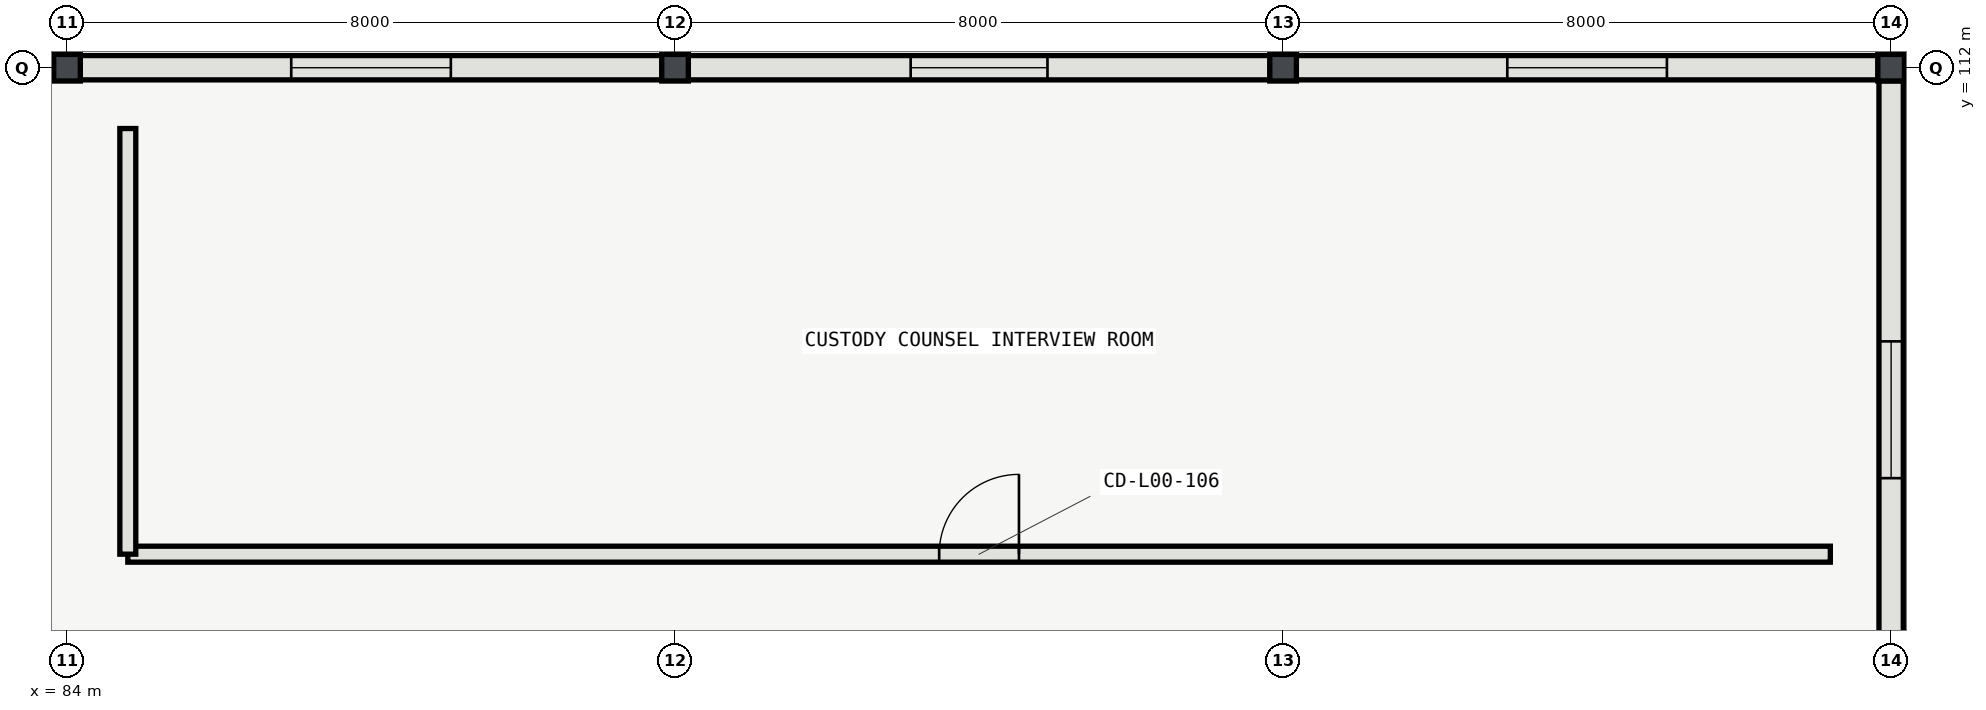
"""IFC4 building model, lengths in metres.
Left out: names, types, materials, properties, quantities, classifications, styles, units other than length and angle.
Written with IfcOpenShell. Run it as: python <this file> out.ifc"""

import sys

from ifc_helpers import new_model, si_unit, direction, frame, frame_2d, origin, origin_2d, place, context, subcontext, project, spatial, rectangle, i_section, extrude, element, fill, save


model = new_model("IFC4")
c1 = context("Model", 3, precision=1e-05, world=origin(), true_north=direction((0.0, 1.0)))
c2 = subcontext(c1, "Body", "Model", "MODEL_VIEW")
j1 = project(units=[si_unit("LENGTHUNIT", "METRE"), si_unit("PLANEANGLEUNIT", "RADIAN")], contexts=[c1])
p1 = place(None, origin())
s1 = spatial("IfcSite", under=j1, at=p1, CompositionType="ELEMENT")
p2 = place(p1, origin())
s2 = spatial("IfcBuilding", under=s1, at=p2, CompositionType="ELEMENT")
p3 = place(p2, origin())
s3 = spatial("IfcBuildingStorey", under=s2, at=p3, CompositionType="ELEMENT", Elevation=0.0)
for number, where, z_axis, x_axis in (
    (1, (84.0, 112.0, 0.0), (0.0, 0.0, 1.0), (1.0, 0.0, 0.0)),
    (2, (92.0, 112.0, 0.0), (0.0, 0.0, 1.0), (1.0, 0.0, 0.0)),
    (3, (100.0, 112.0, 0.0), (0.0, 0.0, 1.0), (1.0, 0.0, 0.0)),
    (4, (108.0, 112.0, 0.0), (0.0, 0.0, 1.0), (1.0, 0.0, 0.0)),
):
    element("IfcColumn", number, at=place(p3, frame(where, z_axis=z_axis, x_axis=x_axis)), inside=s3, PredefinedType="COLUMN", context=c2, shape_type="SweptSolid", body=[
        extrude(i_section(OverallWidth=0.35, OverallDepth=0.35, WebThickness=0.012, FlangeThickness=0.019, FilletRadius=0.02, at=origin_2d()), origin(), (0.0, 0.0, 1.0), 5.4),
    ])
p4 = place(p3, frame((83.829, 112.0, 0.0), z_axis=(0.0, 0.0, 1.0), x_axis=(-1.0, 0.0, 0.0)))
e5 = element("IfcWall", 5, at=p4, inside=s3, PredefinedType="SOLIDWALL", context=c2, shape_type="SweptSolid", body=[
    extrude(rectangle(XDim=7.658, YDim=0.32, at=frame_2d((3.829, 0.0))), origin(), (0.0, 0.0, 1.0), 4.683),
])
p5 = place(p4, frame((2.929, 0.0, 2.4)))
e6 = element("IfcOpeningElement", 6, at=p5, cuts=e5, PredefinedType="OPENING", context=c2, shape_type="SweptSolid", body=[
    extrude(rectangle(XDim=1.8, YDim=0.85, at=frame_2d((0.9, 0.425))), frame((0.0, 0.17, 0.0), z_axis=(0.0, -1.0, 0.0), x_axis=(1.0, 0.0, 0.0)), (0.0, 0.0, 1.0), 0.34),
])
p6 = place(p3, frame((91.829, 112.0, 0.0), z_axis=(0.0, 0.0, 1.0), x_axis=(-1.0, 0.0, 0.0)))
e7 = element("IfcWall", 7, at=p6, inside=s3, PredefinedType="SOLIDWALL", context=c2, shape_type="SweptSolid", body=[
    extrude(rectangle(XDim=7.658, YDim=0.32, at=frame_2d((3.829, 0.0))), origin(), (0.0, 0.0, 1.0), 4.683),
])
p7 = place(p6, frame((2.779, 0.0, 2.4)))
e8 = element("IfcOpeningElement", 8, at=p7, cuts=e7, PredefinedType="OPENING", context=c2, shape_type="SweptSolid", body=[
    extrude(rectangle(XDim=2.1, YDim=0.85, at=frame_2d((1.05, 0.425))), frame((0.0, 0.17, 0.0), z_axis=(0.0, -1.0, 0.0), x_axis=(1.0, 0.0, 0.0)), (0.0, 0.0, 1.0), 0.34),
])
p8 = place(p3, frame((99.829, 112.0, 0.0), z_axis=(0.0, 0.0, 1.0), x_axis=(-1.0, 0.0, 0.0)))
e9 = element("IfcWall", 9, at=p8, inside=s3, PredefinedType="SOLIDWALL", context=c2, shape_type="SweptSolid", body=[
    extrude(rectangle(XDim=7.658, YDim=0.32, at=frame_2d((3.829, 0.0))), origin(), (0.0, 0.0, 1.0), 4.683),
])
p9 = place(p8, frame((2.929, 0.0, 2.4)))
e10 = element("IfcOpeningElement", 10, at=p9, cuts=e9, PredefinedType="OPENING", context=c2, shape_type="SweptSolid", body=[
    extrude(rectangle(XDim=1.8, YDim=0.85, at=frame_2d((0.9, 0.425))), frame((0.0, 0.17, 0.0), z_axis=(0.0, -1.0, 0.0), x_axis=(1.0, 0.0, 0.0)), (0.0, 0.0, 1.0), 0.34),
])
p10 = place(p3, frame((107.829, 112.0, 0.0), z_axis=(0.0, 0.0, 1.0), x_axis=(-1.0, 0.0, 0.0)))
e11 = element("IfcWall", 11, at=p10, inside=s3, PredefinedType="SOLIDWALL", context=c2, shape_type="SweptSolid", body=[
    extrude(rectangle(XDim=7.658, YDim=0.32, at=frame_2d((3.829, 0.0))), origin(), (0.0, 0.0, 1.0), 4.683),
])
p11 = place(p10, frame((2.779, 0.0, 2.4)))
e12 = element("IfcOpeningElement", 12, at=p11, cuts=e11, PredefinedType="OPENING", context=c2, shape_type="SweptSolid", body=[
    extrude(rectangle(XDim=2.1, YDim=0.85, at=frame_2d((1.05, 0.425))), frame((0.0, 0.17, 0.0), z_axis=(0.0, -1.0, 0.0), x_axis=(1.0, 0.0, 0.0)), (0.0, 0.0, 1.0), 0.34),
])
p12 = place(p3, frame((108.0, 103.171, 0.0), z_axis=(0.0, 0.0, 1.0), x_axis=(0.0, 1.0, 0.0)))
e13 = element("IfcWall", 13, at=p12, inside=s3, PredefinedType="SOLIDWALL", context=c2, shape_type="SweptSolid", body=[
    extrude(rectangle(XDim=8.658, YDim=0.32, at=frame_2d((4.329, 0.0))), origin(), (0.0, 0.0, 1.0), 4.641),
])
p13 = place(p12, frame((3.429, 0.0, 2.4)))
e14 = element("IfcOpeningElement", 14, at=p13, cuts=e13, PredefinedType="OPENING", context=c2, shape_type="SweptSolid", body=[
    extrude(rectangle(XDim=1.8, YDim=0.85, at=frame_2d((0.9, 0.425))), frame((0.0, 0.17, 0.0), z_axis=(0.0, -1.0, 0.0), x_axis=(1.0, 0.0, 0.0)), (0.0, 0.0, 1.0), 0.34),
])
p14 = place(p3, frame((84.8, 105.6, 0.0), z_axis=(0.0, 0.0, 1.0), x_axis=(1.0, 0.0, 0.0)))
e15 = element("IfcWall", 15, at=p14, inside=s3, PredefinedType="PARTITIONING", context=c2, shape_type="SweptSolid", body=[
    extrude(rectangle(XDim=22.4, YDim=0.21, at=frame_2d((11.2, 0.0))), origin(), (0.0, 0.0, 1.0), 5.12),
])
p15 = place(p14, frame((10.675, 0.0, 0.0)))
e16 = element("IfcOpeningElement", 16, at=p15, cuts=e15, PredefinedType="OPENING", context=c2, shape_type="SweptSolid", body=[
    extrude(rectangle(XDim=1.05, YDim=2.15, at=frame_2d((0.525, 1.075))), frame((0.0, 0.115, 0.0), z_axis=(0.0, -1.0, 0.0), x_axis=(1.0, 0.0, 0.0)), (0.0, 0.0, 1.0), 0.23),
])
p16 = place(p3, frame((84.8, 111.2, 0.0), z_axis=(0.0, 0.0, 1.0), x_axis=(0.0, -1.0, 0.0)))
e17 = element("IfcWall", 17, at=p16, inside=s3, PredefinedType="PARTITIONING", context=c2, shape_type="SweptSolid", body=[
    extrude(rectangle(XDim=5.6, YDim=0.21, at=frame_2d((2.8, 0.0))), origin(), (0.0, 0.0, 1.0), 5.12),
])
p17 = place(p7, origin())
e18 = element("IfcWindow", 18, at=p17, inside=s3, PartitioningType="SINGLE_PANEL", PredefinedType="WINDOW", context=c2, shape_type="SweptSolid", body=[
    extrude(rectangle(XDim=2.1, YDim=0.85, at=frame_2d((1.05, 0.425))), frame((0.0, 0.03, 0.0), z_axis=(0.0, -1.0, 0.0), x_axis=(1.0, 0.0, 0.0)), (0.0, 0.0, 1.0), 0.06),
])
fill(e8, e18)
p18 = place(p9, origin())
e19 = element("IfcWindow", 19, at=p18, inside=s3, PartitioningType="SINGLE_PANEL", PredefinedType="WINDOW", context=c2, shape_type="SweptSolid", body=[
    extrude(rectangle(XDim=1.8, YDim=0.85, at=frame_2d((0.9, 0.425))), frame((0.0, 0.03, 0.0), z_axis=(0.0, -1.0, 0.0), x_axis=(1.0, 0.0, 0.0)), (0.0, 0.0, 1.0), 0.06),
])
fill(e10, e19)
p19 = place(p11, origin())
e20 = element("IfcWindow", 20, at=p19, inside=s3, PartitioningType="SINGLE_PANEL", PredefinedType="WINDOW", context=c2, shape_type="SweptSolid", body=[
    extrude(rectangle(XDim=2.1, YDim=0.85, at=frame_2d((1.05, 0.425))), frame((0.0, 0.03, 0.0), z_axis=(0.0, -1.0, 0.0), x_axis=(1.0, 0.0, 0.0)), (0.0, 0.0, 1.0), 0.06),
])
fill(e12, e20)
p20 = place(p13, origin())
e21 = element("IfcWindow", 21, at=p20, inside=s3, PartitioningType="SINGLE_PANEL", PredefinedType="WINDOW", context=c2, shape_type="SweptSolid", body=[
    extrude(rectangle(XDim=1.8, YDim=0.85, at=frame_2d((0.9, 0.425))), frame((0.0, 0.03, 0.0), z_axis=(0.0, -1.0, 0.0), x_axis=(1.0, 0.0, 0.0)), (0.0, 0.0, 1.0), 0.06),
])
fill(e14, e21)
p21 = place(p15, origin())
e22 = element("IfcDoor", 22, at=p21, inside=s3, OperationType="SINGLE_SWING_RIGHT", PredefinedType="DOOR", context=c2, shape_type="SweptSolid", body=[
    extrude(rectangle(XDim=1.05, YDim=2.15, at=frame_2d((0.525, 1.075))), frame((0.0, 0.025, 0.0), z_axis=(0.0, -1.0, 0.0), x_axis=(1.0, 0.0, 0.0)), (0.0, 0.0, 1.0), 0.05),
])
fill(e16, e22)
save(model, sys.argv[1])
